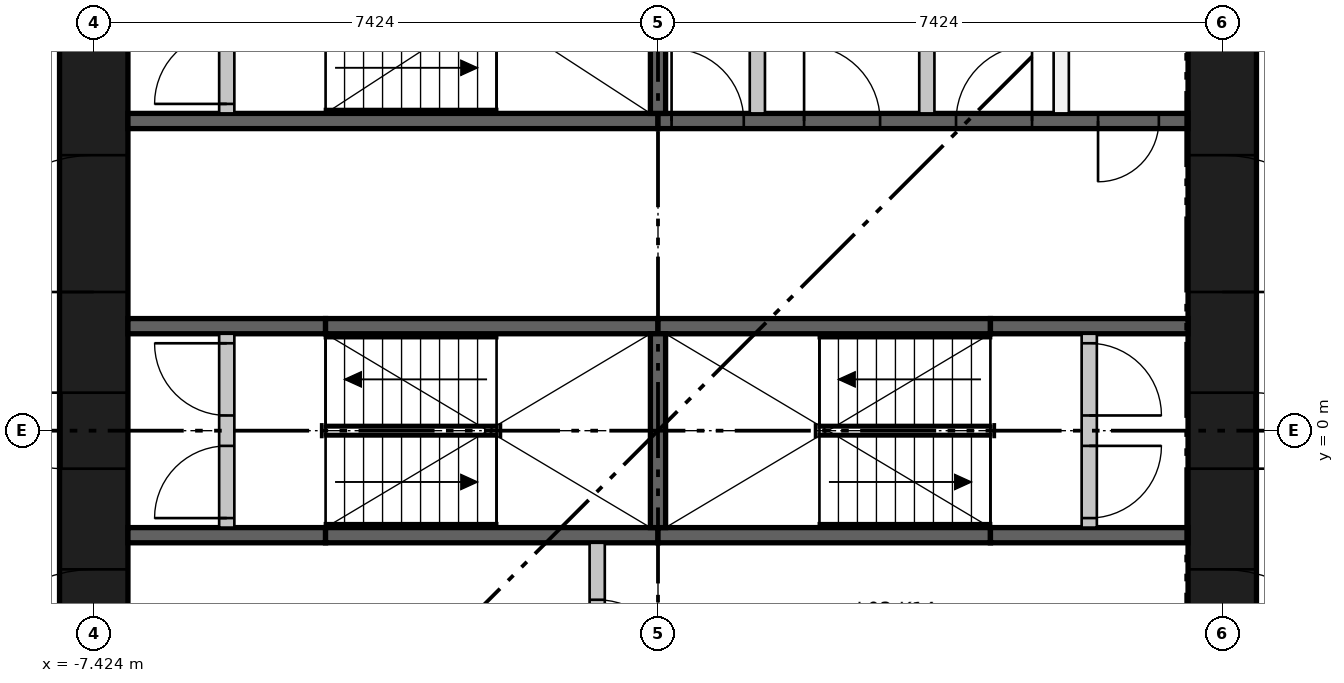
"""IFC4 building model, lengths in metres.
Left out: names, types, materials, properties, quantities, classifications, styles, units other than length and angle.
Written with IfcOpenShell. Run it as: python <this file> out.ifc"""

import sys

from ifc_helpers import new_model, si_unit, direction, frame, frame_2d, origin, place, context, subcontext, project, spatial, rectangle, extrude, element, fill, save


model = new_model("IFC4")
c1 = context("Model", 3, precision=1e-05, world=origin(), true_north=direction((0.0, 1.0)))
c2 = subcontext(c1, "Body", "Model", "MODEL_VIEW")
j1 = project(units=[si_unit("LENGTHUNIT", "METRE"), si_unit("PLANEANGLEUNIT", "RADIAN")], contexts=[c1])
p1 = place(None, origin())
s1 = spatial("IfcSite", under=j1, at=p1, CompositionType="ELEMENT")
p2 = place(p1, origin())
s2 = spatial("IfcBuilding", under=s1, at=p2, CompositionType="ELEMENT")
p3 = place(p2, frame((0.0, 0.0, 14.4)))
s3 = spatial("IfcBuildingStorey", under=s2, at=p3, CompositionType="ELEMENT", Elevation=14.4)
p4 = place(p3, frame((-7.424, -6.974, 0.0), z_axis=(0.0, 0.0, 1.0), x_axis=(0.0, 1.0, 0.0)))
e1 = element("IfcWall", 1, at=p4, inside=s3, PredefinedType="SHEAR", context=c2, shape_type="SweptSolid", body=[
    extrude(rectangle(XDim=13.948, YDim=0.9, at=frame_2d((6.974, 0.0))), origin(), (0.0, 0.0, 1.0), 4.1),
])
p5 = place(p4, frame((6.474, 0.0, 0.0)))
e2 = element("IfcOpeningElement", 2, at=p5, cuts=e1, PredefinedType="OPENING", context=c2, shape_type="SweptSolid", body=[
    extrude(rectangle(XDim=1.0, YDim=2.1, at=frame_2d((0.5, 1.05))), frame((0.0, 0.46, 0.0), z_axis=(0.0, -1.0, 0.0), x_axis=(1.0, 0.0, 0.0)), (0.0, 0.0, 1.0), 0.92),
])
p6 = place(p4, frame((3.35, 0.0, 0.0)))
e3 = element("IfcOpeningElement", 3, at=p6, cuts=e1, PredefinedType="OPENING", context=c2, shape_type="SweptSolid", body=[
    extrude(rectangle(XDim=1.8, YDim=2.1, at=frame_2d((0.9, 1.05))), frame((0.0, 0.46, 0.0), z_axis=(0.0, -1.0, 0.0), x_axis=(1.0, 0.0, 0.0)), (0.0, 0.0, 1.0), 0.92),
])
p7 = place(p4, frame((8.799, 0.0, 0.0)))
e4 = element("IfcOpeningElement", 4, at=p7, cuts=e1, PredefinedType="OPENING", context=c2, shape_type="SweptSolid", body=[
    extrude(rectangle(XDim=1.8, YDim=2.1, at=frame_2d((0.9, 1.05))), frame((0.0, 0.46, 0.0), z_axis=(0.0, -1.0, 0.0), x_axis=(1.0, 0.0, 0.0)), (0.0, 0.0, 1.0), 0.92),
])
p8 = place(p4, frame((11.974, 0.0, 0.0)))
e5 = element("IfcOpeningElement", 5, at=p8, cuts=e1, PredefinedType="OPENING", context=c2, shape_type="SweptSolid", body=[
    extrude(rectangle(XDim=1.0, YDim=2.1, at=frame_2d((0.5, 1.05))), frame((0.0, 0.46, 0.0), z_axis=(0.0, -1.0, 0.0), x_axis=(1.0, 0.0, 0.0)), (0.0, 0.0, 1.0), 0.92),
])
p9 = place(p3, frame((7.424, -6.974, 0.0), z_axis=(0.0, 0.0, 1.0), x_axis=(0.0, 1.0, 0.0)))
e6 = element("IfcWall", 6, at=p9, inside=s3, PredefinedType="SHEAR", context=c2, shape_type="SweptSolid", body=[
    extrude(rectangle(XDim=13.948, YDim=0.9, at=frame_2d((6.974, 0.0))), origin(), (0.0, 0.0, 1.0), 4.1),
])
p10 = place(p9, frame((6.474, 0.0, 0.0)))
e7 = element("IfcOpeningElement", 7, at=p10, cuts=e6, PredefinedType="OPENING", context=c2, shape_type="SweptSolid", body=[
    extrude(rectangle(XDim=1.0, YDim=2.1, at=frame_2d((0.5, 1.05))), frame((0.0, 0.46, 0.0), z_axis=(0.0, -1.0, 0.0), x_axis=(1.0, 0.0, 0.0)), (0.0, 0.0, 1.0), 0.92),
])
p11 = place(p9, frame((3.35, 0.0, 0.0)))
e8 = element("IfcOpeningElement", 8, at=p11, cuts=e6, PredefinedType="OPENING", context=c2, shape_type="SweptSolid", body=[
    extrude(rectangle(XDim=1.8, YDim=2.1, at=frame_2d((0.9, 1.05))), frame((0.0, 0.46, 0.0), z_axis=(0.0, -1.0, 0.0), x_axis=(1.0, 0.0, 0.0)), (0.0, 0.0, 1.0), 0.92),
])
p12 = place(p9, frame((8.799, 0.0, 0.0)))
e9 = element("IfcOpeningElement", 9, at=p12, cuts=e6, PredefinedType="OPENING", context=c2, shape_type="SweptSolid", body=[
    extrude(rectangle(XDim=1.8, YDim=2.1, at=frame_2d((0.9, 1.05))), frame((0.0, 0.46, 0.0), z_axis=(0.0, -1.0, 0.0), x_axis=(1.0, 0.0, 0.0)), (0.0, 0.0, 1.0), 0.92),
])
p13 = place(p3, frame((-6.974, 4.074, 0.0), z_axis=(0.0, 0.0, 1.0), x_axis=(1.0, 0.0, 0.0)))
e10 = element("IfcWall", 10, at=p13, inside=s3, PredefinedType="SHEAR", context=c2, shape_type="SweptSolid", body=[
    extrude(rectangle(XDim=6.974, YDim=0.2, at=frame_2d((3.487, 0.0))), origin(), (0.0, 0.0, 1.0), 3.7),
])
p14 = place(p3, frame((0.0, 4.074, 0.0), z_axis=(0.0, 0.0, 1.0), x_axis=(1.0, 0.0, 0.0)))
e11 = element("IfcWall", 11, at=p14, inside=s3, PredefinedType="SHEAR", context=c2, shape_type="SweptSolid", body=[
    extrude(rectangle(XDim=6.974, YDim=0.2, at=frame_2d((3.487, 0.0))), origin(), (0.0, 0.0, 1.0), 3.7),
])
p15 = place(p14, frame((0.179, 0.0, 0.0)))
e12 = element("IfcOpeningElement", 12, at=p15, cuts=e11, PredefinedType="OPENING", context=c2, shape_type="SweptSolid", body=[
    extrude(rectangle(XDim=0.95, YDim=2.1, at=frame_2d((0.475, 1.05))), frame((0.0, 0.11, 0.0), z_axis=(0.0, -1.0, 0.0), x_axis=(1.0, 0.0, 0.0)), (0.0, 0.0, 1.0), 0.22),
])
p16 = place(p14, frame((1.922, 0.0, 0.0)))
e13 = element("IfcOpeningElement", 13, at=p16, cuts=e11, PredefinedType="OPENING", context=c2, shape_type="SweptSolid", body=[
    extrude(rectangle(XDim=1.0, YDim=2.1, at=frame_2d((0.5, 1.05))), frame((0.0, 0.11, 0.0), z_axis=(0.0, -1.0, 0.0), x_axis=(1.0, 0.0, 0.0)), (0.0, 0.0, 1.0), 0.22),
])
p17 = place(p14, frame((3.921, 0.0, 0.0)))
e14 = element("IfcOpeningElement", 14, at=p17, cuts=e11, PredefinedType="OPENING", context=c2, shape_type="SweptSolid", body=[
    extrude(rectangle(XDim=1.0, YDim=2.1, at=frame_2d((0.5, 1.05))), frame((0.0, 0.11, 0.0), z_axis=(0.0, -1.0, 0.0), x_axis=(1.0, 0.0, 0.0)), (0.0, 0.0, 1.0), 0.22),
])
p18 = place(p14, frame((5.79, 0.0, 0.0)))
e15 = element("IfcOpeningElement", 15, at=p18, cuts=e11, PredefinedType="OPENING", context=c2, shape_type="SweptSolid", body=[
    extrude(rectangle(XDim=0.8, YDim=2.1, at=frame_2d((0.4, 1.05))), frame((0.0, 0.11, 0.0), z_axis=(0.0, -1.0, 0.0), x_axis=(1.0, 0.0, 0.0)), (0.0, 0.0, 1.0), 0.22),
])
p19 = place(p3, frame((-6.974, -1.375, 0.0), z_axis=(0.0, 0.0, 1.0), x_axis=(1.0, 0.0, 0.0)))
e16 = element("IfcWall", 16, at=p19, inside=s3, PredefinedType="SHEAR", context=c2, shape_type="SweptSolid", body=[
    extrude(rectangle(XDim=2.6, YDim=0.2, at=frame_2d((1.3, 0.0))), origin(), (0.0, 0.0, 1.0), 3.7),
])
for number, where, z_axis, x_axis in (
    (17, (-4.374, -1.375, 0.0), (0.0, 0.0, 1.0), (1.0, 0.0, 0.0)),
    (18, (0.0, -1.375, 0.0), (0.0, 0.0, 1.0), (1.0, 0.0, 0.0)),
):
    element("IfcWall", number, at=place(p3, frame(where, z_axis=z_axis, x_axis=x_axis)), inside=s3, PredefinedType="SHEAR", context=c2, shape_type="SweptSolid", body=[
        extrude(rectangle(XDim=4.374, YDim=0.2, at=frame_2d((2.187, 0.0))), origin(), (0.0, 0.0, 1.0), 3.7),
    ])
for number, where, z_axis, x_axis in (
    (19, (4.374, -1.375, 0.0), (0.0, 0.0, 1.0), (1.0, 0.0, 0.0)),
    (20, (-6.974, 1.375, 0.0), (0.0, 0.0, 1.0), (1.0, 0.0, 0.0)),
):
    element("IfcWall", number, at=place(p3, frame(where, z_axis=z_axis, x_axis=x_axis)), inside=s3, PredefinedType="SHEAR", context=c2, shape_type="SweptSolid", body=[
        extrude(rectangle(XDim=2.6, YDim=0.2, at=frame_2d((1.3, 0.0))), origin(), (0.0, 0.0, 1.0), 3.7),
    ])
for number, where, z_axis, x_axis in (
    (21, (-4.374, 1.375, 0.0), (0.0, 0.0, 1.0), (1.0, 0.0, 0.0)),
    (22, (0.0, 1.375, 0.0), (0.0, 0.0, 1.0), (1.0, 0.0, 0.0)),
):
    element("IfcWall", number, at=place(p3, frame(where, z_axis=z_axis, x_axis=x_axis)), inside=s3, PredefinedType="SHEAR", context=c2, shape_type="SweptSolid", body=[
        extrude(rectangle(XDim=4.374, YDim=0.2, at=frame_2d((2.187, 0.0))), origin(), (0.0, 0.0, 1.0), 3.7),
    ])
p20 = place(p3, frame((4.374, 1.375, 0.0), z_axis=(0.0, 0.0, 1.0), x_axis=(1.0, 0.0, 0.0)))
e23 = element("IfcWall", 23, at=p20, inside=s3, PredefinedType="SHEAR", context=c2, shape_type="SweptSolid", body=[
    extrude(rectangle(XDim=2.6, YDim=0.2, at=frame_2d((1.3, 0.0))), origin(), (0.0, 0.0, 1.0), 3.7),
])
p21 = place(p3, frame((0.0, -1.275, 0.0), z_axis=(0.0, 0.0, 1.0), x_axis=(0.0, 1.0, 0.0)))
e24 = element("IfcWall", 24, at=p21, inside=s3, PredefinedType="SHEAR", context=c2, shape_type="SweptSolid", body=[
    extrude(rectangle(XDim=2.55, YDim=0.2, at=frame_2d((1.275, 0.0))), origin(), (0.0, 0.0, 1.0), 3.7),
])
p22 = place(p3, frame((-0.8, -3.974, 0.0), z_axis=(0.0, 0.0, 1.0), x_axis=(0.0, 1.0, 0.0)))
e25 = element("IfcWall", 25, at=p22, inside=s3, PredefinedType="PARTITIONING", context=c2, shape_type="SweptSolid", body=[
    extrude(rectangle(XDim=2.499, YDim=0.2, at=frame_2d((1.25, 0.0))), origin(), (0.0, 0.0, 1.0), 3.7),
])
p23 = place(p22, frame((0.75, 0.0, 0.0)))
e26 = element("IfcOpeningElement", 26, at=p23, cuts=e25, PredefinedType="OPENING", context=c2, shape_type="SweptSolid", body=[
    extrude(rectangle(XDim=1.0, YDim=2.1, at=frame_2d((0.5, 1.05))), frame((0.0, 0.11, 0.0), z_axis=(0.0, -1.0, 0.0), x_axis=(1.0, 0.0, 0.0)), (0.0, 0.0, 1.0), 0.22),
])
p24 = place(p3, frame((0.0, 4.174, 0.0), z_axis=(0.0, 0.0, 1.0), x_axis=(0.0, 1.0, 0.0)))
e27 = element("IfcWall", 27, at=p24, inside=s3, PredefinedType="SHEAR", context=c2, shape_type="SweptSolid", body=[
    extrude(rectangle(XDim=1.4, YDim=0.2, at=frame_2d((0.7, 0.0))), origin(), (0.0, 0.0, 1.0), 3.7),
])
for number, where, z_axis, x_axis in (
    (28, (1.307, 4.174, 0.0), (0.0, 0.0, 1.0), (0.0, 1.0, 0.0)),
    (29, (3.537, 4.174, 0.0), (0.0, 0.0, 1.0), (0.0, 1.0, 0.0)),
    (30, (5.305, 4.174, 0.0), (0.0, 0.0, 1.0), (0.0, 1.0, 0.0)),
):
    element("IfcWall", number, at=place(p3, frame(where, z_axis=z_axis, x_axis=x_axis)), inside=s3, PredefinedType="PARTITIONING", context=c2, shape_type="SweptSolid", body=[
        extrude(rectangle(XDim=2.8, YDim=0.2, at=frame_2d((1.4, 0.0))), origin(), (0.0, 0.0, 1.0), 3.7),
    ])
p25 = place(p3, frame((-5.674, -1.275, 0.0), z_axis=(0.0, 0.0, 1.0), x_axis=(0.0, 1.0, 0.0)))
e31 = element("IfcWall", 31, at=p25, inside=s3, PredefinedType="PARTITIONING", context=c2, shape_type="SweptSolid", body=[
    extrude(rectangle(XDim=2.55, YDim=0.2, at=frame_2d((1.275, 0.0))), origin(), (0.0, 0.0, 1.0), 3.7),
])
p26 = place(p25, frame((0.125, 0.0, 0.0)))
e32 = element("IfcOpeningElement", 32, at=p26, cuts=e31, PredefinedType="OPENING", context=c2, shape_type="SweptSolid", body=[
    extrude(rectangle(XDim=0.95, YDim=2.1, at=frame_2d((0.475, 1.05))), frame((0.0, 0.11, 0.0), z_axis=(0.0, -1.0, 0.0), x_axis=(1.0, 0.0, 0.0)), (0.0, 0.0, 1.0), 0.22),
])
p27 = place(p25, frame((1.475, 0.0, 0.0)))
e33 = element("IfcOpeningElement", 33, at=p27, cuts=e31, PredefinedType="OPENING", context=c2, shape_type="SweptSolid", body=[
    extrude(rectangle(XDim=0.95, YDim=2.1, at=frame_2d((0.475, 1.05))), frame((0.0, 0.11, 0.0), z_axis=(0.0, -1.0, 0.0), x_axis=(1.0, 0.0, 0.0)), (0.0, 0.0, 1.0), 0.22),
])
p28 = place(p3, frame((5.674, -1.275, 0.0), z_axis=(0.0, 0.0, 1.0), x_axis=(0.0, 1.0, 0.0)))
e34 = element("IfcWall", 34, at=p28, inside=s3, PredefinedType="PARTITIONING", context=c2, shape_type="SweptSolid", body=[
    extrude(rectangle(XDim=2.55, YDim=0.2, at=frame_2d((1.275, 0.0))), origin(), (0.0, 0.0, 1.0), 3.7),
])
p29 = place(p28, frame((0.125, 0.0, 0.0)))
e35 = element("IfcOpeningElement", 35, at=p29, cuts=e34, PredefinedType="OPENING", context=c2, shape_type="SweptSolid", body=[
    extrude(rectangle(XDim=0.95, YDim=2.1, at=frame_2d((0.475, 1.05))), frame((0.0, 0.11, 0.0), z_axis=(0.0, -1.0, 0.0), x_axis=(1.0, 0.0, 0.0)), (0.0, 0.0, 1.0), 0.22),
])
p30 = place(p28, frame((1.475, 0.0, 0.0)))
e36 = element("IfcOpeningElement", 36, at=p30, cuts=e34, PredefinedType="OPENING", context=c2, shape_type="SweptSolid", body=[
    extrude(rectangle(XDim=0.95, YDim=2.1, at=frame_2d((0.475, 1.05))), frame((0.0, 0.11, 0.0), z_axis=(0.0, -1.0, 0.0), x_axis=(1.0, 0.0, 0.0)), (0.0, 0.0, 1.0), 0.22),
])
p31 = place(p3, frame((-5.674, 4.174, 0.0), z_axis=(0.0, 0.0, 1.0), x_axis=(0.0, 1.0, 0.0)))
e37 = element("IfcWall", 37, at=p31, inside=s3, PredefinedType="PARTITIONING", context=c2, shape_type="SweptSolid", body=[
    extrude(rectangle(XDim=2.8, YDim=0.2, at=frame_2d((1.4, 0.0))), origin(), (0.0, 0.0, 1.0), 3.7),
])
p32 = place(p31, frame((0.125, 0.0, 0.0)))
e38 = element("IfcOpeningElement", 38, at=p32, cuts=e37, PredefinedType="OPENING", context=c2, shape_type="SweptSolid", body=[
    extrude(rectangle(XDim=0.95, YDim=2.1, at=frame_2d((0.475, 1.05))), frame((0.0, 0.11, 0.0), z_axis=(0.0, -1.0, 0.0), x_axis=(1.0, 0.0, 0.0)), (0.0, 0.0, 1.0), 0.22),
])
p33 = place(p31, frame((1.725, 0.0, 0.0)))
e39 = element("IfcOpeningElement", 39, at=p33, cuts=e37, PredefinedType="OPENING", context=c2, shape_type="SweptSolid", body=[
    extrude(rectangle(XDim=0.95, YDim=2.1, at=frame_2d((0.475, 1.05))), frame((0.0, 0.11, 0.0), z_axis=(0.0, -1.0, 0.0), x_axis=(1.0, 0.0, 0.0)), (0.0, 0.0, 1.0), 0.22),
])
p34 = place(p26, origin())
e40 = element("IfcDoor", 40, at=p34, inside=s3, OperationType="SINGLE_SWING_LEFT", PredefinedType="DOOR", context=c2, shape_type="SweptSolid", body=[
    extrude(rectangle(XDim=0.95, YDim=2.1, at=frame_2d((0.475, 1.05))), frame((0.0, 0.025, 0.0), z_axis=(0.0, -1.0, 0.0), x_axis=(1.0, 0.0, 0.0)), (0.0, 0.0, 1.0), 0.05),
])
fill(e32, e40)
p35 = place(p27, origin())
e41 = element("IfcDoor", 41, at=p35, inside=s3, OperationType="SINGLE_SWING_RIGHT", PredefinedType="DOOR", context=c2, shape_type="SweptSolid", body=[
    extrude(rectangle(XDim=0.95, YDim=2.1, at=frame_2d((0.475, 1.05))), frame((0.0, 0.025, 0.0), z_axis=(0.0, -1.0, 0.0), x_axis=(1.0, 0.0, 0.0)), (0.0, 0.0, 1.0), 0.05),
])
fill(e33, e41)
p36 = place(p29, frame((0.95, 0.0, 0.0), z_axis=(0.0, 0.0, 1.0), x_axis=(-1.0, 0.0, 0.0)))
e42 = element("IfcDoor", 42, at=p36, inside=s3, OperationType="SINGLE_SWING_RIGHT", PredefinedType="DOOR", context=c2, shape_type="SweptSolid", body=[
    extrude(rectangle(XDim=0.95, YDim=2.1, at=frame_2d((0.475, 1.05))), frame((0.0, 0.025, 0.0), z_axis=(0.0, -1.0, 0.0), x_axis=(1.0, 0.0, 0.0)), (0.0, 0.0, 1.0), 0.05),
])
fill(e35, e42)
p37 = place(p30, frame((0.95, 0.0, 0.0), z_axis=(0.0, 0.0, 1.0), x_axis=(-1.0, 0.0, 0.0)))
e43 = element("IfcDoor", 43, at=p37, inside=s3, OperationType="SINGLE_SWING_LEFT", PredefinedType="DOOR", context=c2, shape_type="SweptSolid", body=[
    extrude(rectangle(XDim=0.95, YDim=2.1, at=frame_2d((0.475, 1.05))), frame((0.0, 0.025, 0.0), z_axis=(0.0, -1.0, 0.0), x_axis=(1.0, 0.0, 0.0)), (0.0, 0.0, 1.0), 0.05),
])
fill(e36, e43)
p38 = place(p32, origin())
e44 = element("IfcDoor", 44, at=p38, inside=s3, OperationType="SINGLE_SWING_LEFT", PredefinedType="DOOR", context=c2, shape_type="SweptSolid", body=[
    extrude(rectangle(XDim=0.95, YDim=2.1, at=frame_2d((0.475, 1.05))), frame((0.0, 0.025, 0.0), z_axis=(0.0, -1.0, 0.0), x_axis=(1.0, 0.0, 0.0)), (0.0, 0.0, 1.0), 0.05),
])
fill(e38, e44)
p39 = place(p23, frame((1.0, 0.0, 0.0), z_axis=(0.0, 0.0, 1.0), x_axis=(-1.0, 0.0, 0.0)))
e45 = element("IfcDoor", 45, at=p39, inside=s3, OperationType="SINGLE_SWING_LEFT", PredefinedType="DOOR", context=c2, shape_type="SweptSolid", body=[
    extrude(rectangle(XDim=1.0, YDim=2.1, at=frame_2d((0.5, 1.05))), frame((0.0, 0.025, 0.0), z_axis=(0.0, -1.0, 0.0), x_axis=(1.0, 0.0, 0.0)), (0.0, 0.0, 1.0), 0.05),
])
fill(e26, e45)
p40 = place(p15, origin())
e46 = element("IfcDoor", 46, at=p40, inside=s3, OperationType="SINGLE_SWING_LEFT", PredefinedType="DOOR", context=c2, shape_type="SweptSolid", body=[
    extrude(rectangle(XDim=0.95, YDim=2.1, at=frame_2d((0.475, 1.05))), frame((0.0, 0.025, 0.0), z_axis=(0.0, -1.0, 0.0), x_axis=(1.0, 0.0, 0.0)), (0.0, 0.0, 1.0), 0.05),
])
fill(e12, e46)
p41 = place(p16, origin())
e47 = element("IfcDoor", 47, at=p41, inside=s3, OperationType="SINGLE_SWING_LEFT", PredefinedType="DOOR", context=c2, shape_type="SweptSolid", body=[
    extrude(rectangle(XDim=1.0, YDim=2.1, at=frame_2d((0.5, 1.05))), frame((0.0, 0.025, 0.0), z_axis=(0.0, -1.0, 0.0), x_axis=(1.0, 0.0, 0.0)), (0.0, 0.0, 1.0), 0.05),
])
fill(e13, e47)
p42 = place(p17, origin())
e48 = element("IfcDoor", 48, at=p42, inside=s3, OperationType="SINGLE_SWING_RIGHT", PredefinedType="DOOR", context=c2, shape_type="SweptSolid", body=[
    extrude(rectangle(XDim=1.0, YDim=2.1, at=frame_2d((0.5, 1.05))), frame((0.0, 0.025, 0.0), z_axis=(0.0, -1.0, 0.0), x_axis=(1.0, 0.0, 0.0)), (0.0, 0.0, 1.0), 0.05),
])
fill(e14, e48)
p43 = place(p18, frame((0.8, 0.0, 0.0), z_axis=(0.0, 0.0, 1.0), x_axis=(-1.0, 0.0, 0.0)))
e49 = element("IfcDoor", 49, at=p43, inside=s3, OperationType="SINGLE_SWING_LEFT", PredefinedType="DOOR", context=c2, shape_type="SweptSolid", body=[
    extrude(rectangle(XDim=0.8, YDim=2.1, at=frame_2d((0.4, 1.05))), frame((0.0, 0.025, 0.0), z_axis=(0.0, -1.0, 0.0), x_axis=(1.0, 0.0, 0.0)), (0.0, 0.0, 1.0), 0.05),
])
fill(e15, e49)
p44 = place(p5, origin())
e50 = element("IfcDoor", 50, at=p44, inside=s3, OperationType="SINGLE_SWING_RIGHT", PredefinedType="DOOR", context=c2, shape_type="SweptSolid", body=[
    extrude(rectangle(XDim=1.0, YDim=2.1, at=frame_2d((0.5, 1.05))), frame((0.0, 0.45, 0.0), z_axis=(0.0, -1.0, 0.0), x_axis=(1.0, 0.0, 0.0)), (0.0, 0.0, 1.0), 0.05),
])
fill(e2, e50)
p45 = place(p6, origin())
e51 = element("IfcDoor", 51, at=p45, inside=s3, OperationType="DOUBLE_DOOR_SINGLE_SWING", PredefinedType="DOOR", context=c2, shape_type="SweptSolid", body=[
    extrude(rectangle(XDim=1.8, YDim=2.1, at=frame_2d((0.9, 1.05))), frame((0.0, 0.025, 0.0), z_axis=(0.0, -1.0, 0.0), x_axis=(1.0, 0.0, 0.0)), (0.0, 0.0, 1.0), 0.05),
])
fill(e3, e51)
p46 = place(p7, origin())
e52 = element("IfcDoor", 52, at=p46, inside=s3, OperationType="DOUBLE_DOOR_SINGLE_SWING", PredefinedType="DOOR", context=c2, shape_type="SweptSolid", body=[
    extrude(rectangle(XDim=1.8, YDim=2.1, at=frame_2d((0.9, 1.05))), frame((0.0, 0.025, 0.0), z_axis=(0.0, -1.0, 0.0), x_axis=(1.0, 0.0, 0.0)), (0.0, 0.0, 1.0), 0.05),
])
fill(e4, e52)
p47 = place(p10, frame((1.0, 0.0, 0.0), z_axis=(0.0, 0.0, 1.0), x_axis=(-1.0, 0.0, 0.0)))
e53 = element("IfcDoor", 53, at=p47, inside=s3, OperationType="SINGLE_SWING_LEFT", PredefinedType="DOOR", context=c2, shape_type="SweptSolid", body=[
    extrude(rectangle(XDim=1.0, YDim=2.1, at=frame_2d((0.5, 1.05))), frame((0.0, 0.45, 0.0), z_axis=(0.0, -1.0, 0.0), x_axis=(1.0, 0.0, 0.0)), (0.0, 0.0, 1.0), 0.05),
])
fill(e7, e53)
p48 = place(p11, frame((1.8, 0.0, 0.0), z_axis=(0.0, 0.0, 1.0), x_axis=(-1.0, 0.0, 0.0)))
e54 = element("IfcDoor", 54, at=p48, inside=s3, OperationType="DOUBLE_DOOR_SINGLE_SWING", PredefinedType="DOOR", context=c2, shape_type="SweptSolid", body=[
    extrude(rectangle(XDim=1.8, YDim=2.1, at=frame_2d((0.9, 1.05))), frame((0.0, 0.025, 0.0), z_axis=(0.0, -1.0, 0.0), x_axis=(1.0, 0.0, 0.0)), (0.0, 0.0, 1.0), 0.05),
])
fill(e8, e54)
p49 = place(p12, frame((1.8, 0.0, 0.0), z_axis=(0.0, 0.0, 1.0), x_axis=(-1.0, 0.0, 0.0)))
e55 = element("IfcDoor", 55, at=p49, inside=s3, OperationType="DOUBLE_DOOR_SINGLE_SWING", PredefinedType="DOOR", context=c2, shape_type="SweptSolid", body=[
    extrude(rectangle(XDim=1.8, YDim=2.1, at=frame_2d((0.9, 1.05))), frame((0.0, 0.025, 0.0), z_axis=(0.0, -1.0, 0.0), x_axis=(1.0, 0.0, 0.0)), (0.0, 0.0, 1.0), 0.05),
])
fill(e9, e55)
save(model, sys.argv[1])
